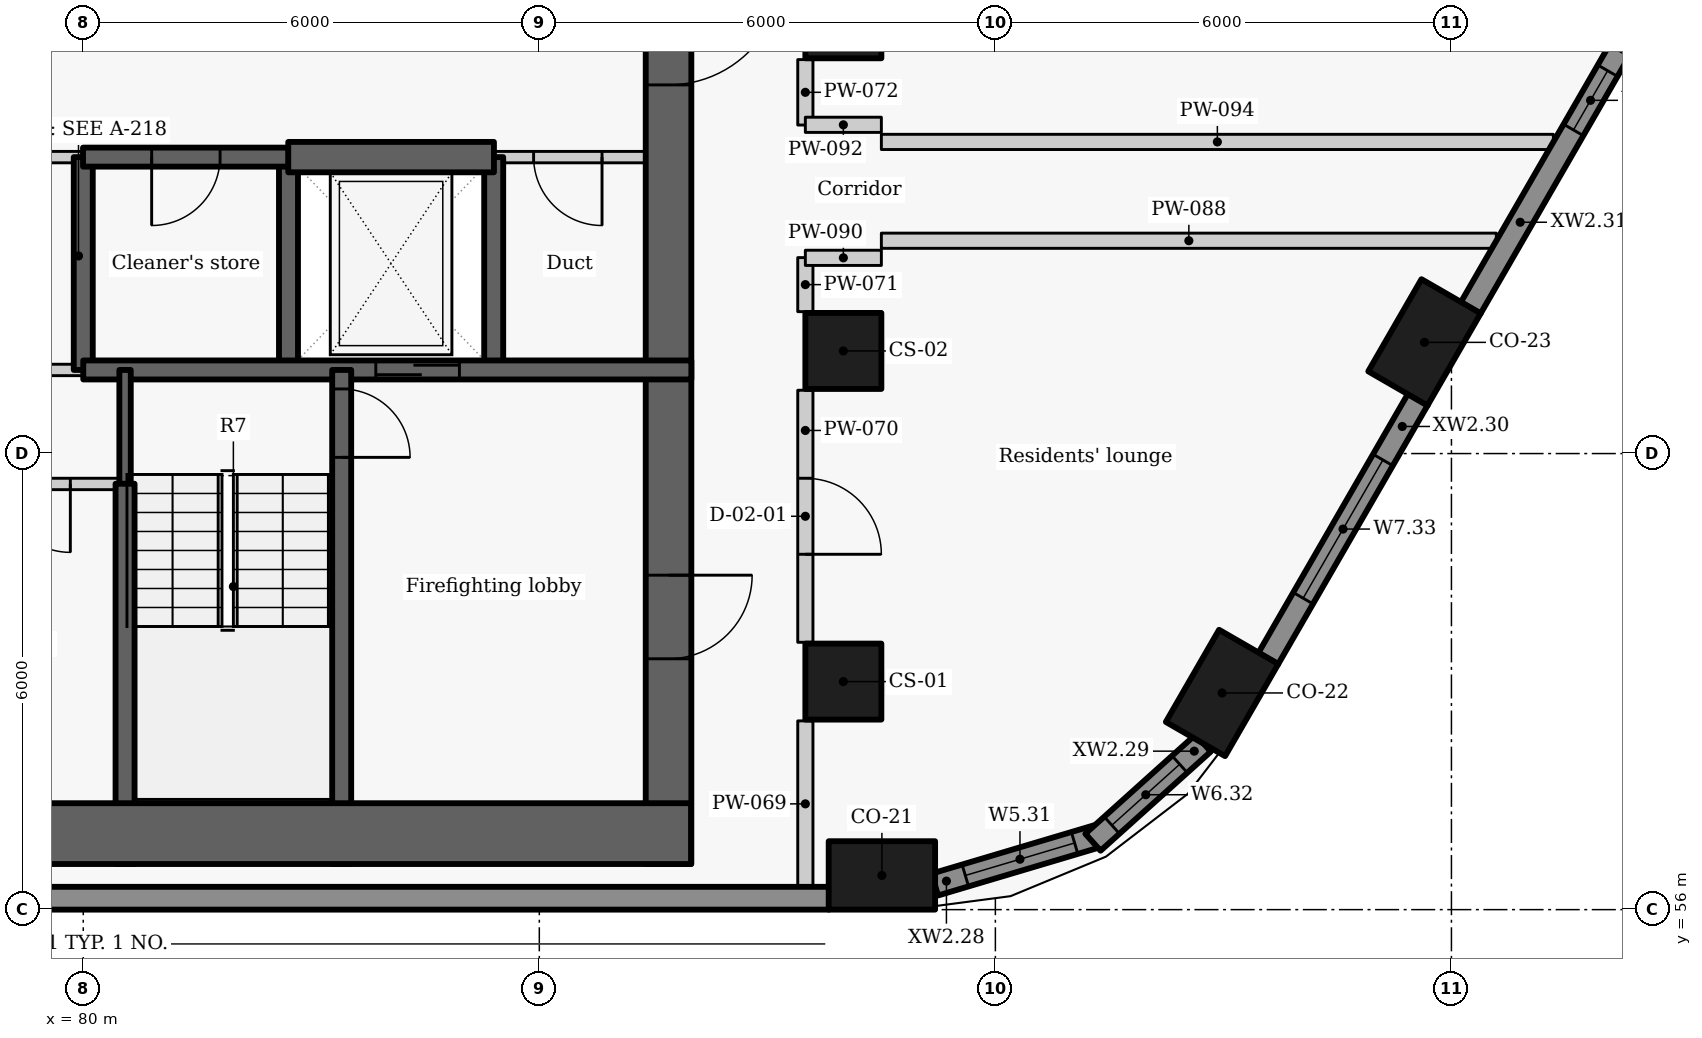
"""IFC4 building model, lengths in metres.
Left out: names, types, materials, properties, quantities, classifications, styles, units other than length and angle.
Written with IfcOpenShell. Run it as: python <this file> out.ifc"""

import sys

from ifc_helpers import new_model, si_unit, direction, frame, frame_2d, origin, origin_2d, place, context, subcontext, project, spatial, rectangle, extrude, element, fill, save


model = new_model("IFC4")
c1 = context("Model", 3, precision=1e-05, world=origin(), true_north=direction((0.0, 1.0)))
c2 = subcontext(c1, "Body", "Model", "MODEL_VIEW")
j1 = project(units=[si_unit("LENGTHUNIT", "METRE"), si_unit("PLANEANGLEUNIT", "RADIAN")], contexts=[c1])
p1 = place(None, origin())
s1 = spatial("IfcSite", under=j1, at=p1, CompositionType="ELEMENT")
p2 = place(p1, origin())
s2 = spatial("IfcBuilding", under=s1, at=p2, CompositionType="ELEMENT")
p3 = place(p2, frame((0.0, 0.0, 87.6)))
s3 = spatial("IfcBuildingStorey", under=s2, at=p3, CompositionType="ELEMENT", Elevation=87.6)
for number, where, z_axis, x_axis in (
    (1, (90.507, 56.45, 0.0), (0.0, 0.0, 1.0), (1.0, 0.0, 0.0)),
    (2, (94.982, 58.851, 0.0), (0.0, 0.0, 1.0), (0.5, 0.866, 0.0)),
    (3, (97.646, 63.463, 0.0), (0.0, 0.0, 1.0), (0.5, 0.866, 0.0)),
    (4, (100.308, 68.075, 0.0), (0.0, 0.0, 1.0), (0.5, 0.866, 0.0)),
):
    element("IfcColumn", number, at=place(p3, frame(where, z_axis=z_axis, x_axis=x_axis)), inside=s3, PredefinedType="COLUMN", context=c2, shape_type="SweptSolid", body=[
        extrude(rectangle(XDim=1.4, YDim=0.9, at=origin_2d()), origin(), (0.0, 0.0, 1.0), 3.3),
    ])
for number, where, z_axis, x_axis in (
    (5, (90.0, 59.0, 0.0), (0.0, 0.0, 1.0), (0.0, 1.0, 0.0)),
    (6, (90.0, 63.35, 0.0), (0.0, 0.0, 1.0), (0.0, 1.0, 0.0)),
    (7, (90.0, 67.7, 0.0), (0.0, 0.0, 1.0), (0.0, 1.0, 0.0)),
):
    element("IfcColumn", number, at=place(p3, frame(where, z_axis=z_axis, x_axis=x_axis)), inside=s3, PredefinedType="COLUMN", context=c2, shape_type="SweptSolid", body=[
        extrude(rectangle(XDim=1.0, YDim=1.0, at=origin_2d()), origin(), (0.0, 0.0, 1.0), 3.3),
    ])
p4 = place(p3, frame((69.871, 56.15, 0.0), z_axis=(0.0, 0.0, 1.0), x_axis=(1.0, 0.0, 0.0)))
e8 = element("IfcWall", 8, at=p4, inside=s3, PredefinedType="SOLIDWALL", context=c2, shape_type="SweptSolid", body=[
    extrude(rectangle(XDim=19.94, YDim=0.3, at=frame_2d((9.97, 0.0))), origin(), (0.0, 0.0, 1.0), 2.425),
])
p5 = place(p3, frame((91.203, 56.33, 0.0), z_axis=(0.0, 0.0, 1.0), x_axis=(0.95847736903, 0.285168604614, 0.0)))
e9 = element("IfcWall", 9, at=p5, inside=s3, PredefinedType="SOLIDWALL", context=c2, shape_type="SweptSolid", body=[
    extrude(rectangle(XDim=2.262, YDim=0.3, at=frame_2d((1.131, 0.0))), origin(), (0.0, 0.0, 1.0), 2.425),
])
p6 = place(p5, frame((0.419, 0.0, 0.9)))
e10 = element("IfcOpeningElement", 10, at=p6, cuts=e9, PredefinedType="OPENING", context=c2, shape_type="SweptSolid", body=[
    extrude(rectangle(XDim=1.5, YDim=1.1, at=frame_2d((0.75, 0.55))), frame((0.0, 0.16, 0.0), z_axis=(0.0, -1.0, 0.0), x_axis=(1.0, 0.0, 0.0)), (0.0, 0.0, 1.0), 0.32),
])
p7 = place(p3, frame((93.283, 56.887, 0.0), z_axis=(0.0, 0.0, 1.0), x_axis=(0.743785734967, 0.668418117992, 0.0)))
e11 = element("IfcWall", 11, at=p7, inside=s3, PredefinedType="SOLIDWALL", context=c2, shape_type="SweptSolid", body=[
    extrude(rectangle(XDim=1.95, YDim=0.3, at=frame_2d((0.975, 0.0))), origin(), (0.0, 0.0, 1.0), 2.425),
])
p8 = place(p7, frame((0.335, 0.0, 0.9)))
e12 = element("IfcOpeningElement", 12, at=p8, cuts=e11, PredefinedType="OPENING", context=c2, shape_type="SweptSolid", body=[
    extrude(rectangle(XDim=1.2, YDim=1.1, at=frame_2d((0.6, 0.55))), frame((0.0, 0.16, 0.0), z_axis=(0.0, -1.0, 0.0), x_axis=(1.0, 0.0, 0.0)), (0.0, 0.0, 1.0), 0.32),
])
p9 = place(p3, frame((95.59, 59.303, 0.0), z_axis=(0.0, 0.0, 1.0), x_axis=(0.500003583557, 0.866023334807, 0.0)))
e13 = element("IfcWall", 13, at=p9, inside=s3, PredefinedType="SOLIDWALL", context=c2, shape_type="SweptSolid", body=[
    extrude(rectangle(XDim=3.934, YDim=0.3, at=frame_2d((1.967, 0.0))), origin(), (0.0, 0.0, 1.0), 2.425),
])
p10 = place(p9, frame((0.917, 0.0, 0.9)))
e14 = element("IfcOpeningElement", 14, at=p10, cuts=e13, PredefinedType="OPENING", context=c2, shape_type="SweptSolid", body=[
    extrude(rectangle(XDim=2.1, YDim=1.1, at=frame_2d((1.05, 0.55))), frame((0.0, 0.16, 0.0), z_axis=(0.0, -1.0, 0.0), x_axis=(1.0, 0.0, 0.0)), (0.0, 0.0, 1.0), 0.32),
])
p11 = place(p3, frame((98.253, 63.916, 0.0), z_axis=(0.0, 0.0, 1.0), x_axis=(0.499957037901, 0.866050206543, 0.0)))
e15 = element("IfcWall", 15, at=p11, inside=s3, PredefinedType="SOLIDWALL", context=c2, shape_type="SweptSolid", body=[
    extrude(rectangle(XDim=3.934, YDim=0.3, at=frame_2d((1.967, 0.0))), origin(), (0.0, 0.0, 1.0), 2.425),
])
p12 = place(p11, frame((2.704, 0.0, 0.9)))
e16 = element("IfcOpeningElement", 16, at=p12, cuts=e15, PredefinedType="OPENING", context=c2, shape_type="SweptSolid", body=[
    extrude(rectangle(XDim=0.9, YDim=1.1, at=frame_2d((0.45, 0.55))), frame((0.0, 0.16, 0.0), z_axis=(0.0, -1.0, 0.0), x_axis=(1.0, 0.0, 0.0)), (0.0, 0.0, 1.0), 0.32),
])
for number, where, z_axis, x_axis in (
    (17, (80.0, 63.1, -0.275), (0.0, 0.0, 1.0), (0.0, 1.0, 0.0)),
    (18, (82.7, 63.1, -0.275), (0.0, 0.0, 1.0), (0.0, 1.0, 0.0)),
    (19, (85.4, 63.1, -0.275), (0.0, 0.0, 1.0), (0.0, 1.0, 0.0)),
):
    element("IfcWall", number, at=place(p3, frame(where, z_axis=z_axis, x_axis=x_axis)), inside=s3, PredefinedType="SHEAR", context=c2, shape_type="SweptSolid", body=[
        extrude(rectangle(XDim=2.8, YDim=0.25, at=frame_2d((1.4, 0.0))), origin(), (0.0, 0.0, 1.0), 3.3),
    ])
p13 = place(p3, frame((87.7, 72.2, -0.275), z_axis=(0.0, 0.0, 1.0), x_axis=(0.0, -1.0, 0.0)))
e20 = element("IfcWall", 20, at=p13, inside=s3, PredefinedType="SHEAR", context=c2, shape_type="SweptSolid", body=[
    extrude(rectangle(XDim=15.6, YDim=0.6, at=frame_2d((7.8, 0.0))), origin(), (0.0, 0.0, 1.0), 3.3),
])
p14 = place(p13, frame((3.85, 0.0, 0.275)))
e21 = element("IfcOpeningElement", 21, at=p14, cuts=e20, PredefinedType="OPENING", context=c2, shape_type="SweptSolid", body=[
    extrude(rectangle(XDim=1.5, YDim=2.1, at=frame_2d((0.75, 1.05))), frame((0.0, 0.31, 0.0), z_axis=(0.0, -1.0, 0.0), x_axis=(1.0, 0.0, 0.0)), (0.0, 0.0, 1.0), 0.62),
])
p15 = place(p13, frame((11.8, 0.0, 0.275)))
e22 = element("IfcOpeningElement", 22, at=p15, cuts=e20, PredefinedType="OPENING", context=c2, shape_type="SweptSolid", body=[
    extrude(rectangle(XDim=1.1, YDim=2.1, at=frame_2d((0.55, 1.05))), frame((0.0, 0.31, 0.0), z_axis=(0.0, -1.0, 0.0), x_axis=(1.0, 0.0, 0.0)), (0.0, 0.0, 1.0), 0.62),
])
p16 = place(p3, frame((80.003, 65.9, 0.0), z_axis=(0.0, 0.0, 1.0), x_axis=(-1.0, 0.0, 0.0)))
e23 = element("IfcWall", 23, at=p16, inside=s3, PredefinedType="PARTITIONING", context=c2, shape_type="SweptSolid", body=[
    extrude(rectangle(XDim=2.706, YDim=0.15, at=frame_2d((1.353, 0.0))), origin(), (0.0, 0.0, 1.0), 3.025),
])
p17 = place(p16, frame((0.753, 0.0, 0.0)))
e24 = element("IfcOpeningElement", 24, at=p17, cuts=e23, PredefinedType="OPENING", context=c2, shape_type="SweptSolid", body=[
    extrude(rectangle(XDim=1.2, YDim=2.1, at=frame_2d((0.6, 1.05))), frame((0.0, 0.085, 0.0), z_axis=(0.0, -1.0, 0.0), x_axis=(1.0, 0.0, 0.0)), (0.0, 0.0, 1.0), 0.17),
])
p18 = place(p3, frame((88.0, 65.9, 0.0), z_axis=(0.0, 0.0, 1.0), x_axis=(-1.0, 0.0, 0.0)))
e25 = element("IfcWall", 25, at=p18, inside=s3, PredefinedType="PARTITIONING", context=c2, shape_type="SweptSolid", body=[
    extrude(rectangle(XDim=2.603, YDim=0.15, at=frame_2d((1.302, 0.0))), origin(), (0.0, 0.0, 1.0), 3.025),
])
p19 = place(p18, frame((1.175, 0.0, 0.0)))
e26 = element("IfcOpeningElement", 26, at=p19, cuts=e25, PredefinedType="OPENING", context=c2, shape_type="SweptSolid", body=[
    extrude(rectangle(XDim=0.9, YDim=2.1, at=frame_2d((0.45, 1.05))), frame((0.0, 0.085, 0.0), z_axis=(0.0, -1.0, 0.0), x_axis=(1.0, 0.0, 0.0)), (0.0, 0.0, 1.0), 0.17),
])
p20 = place(p3, frame((82.703, 65.9, -0.275), z_axis=(0.0, 0.0, 1.0), x_axis=(-1.0, 0.0, 0.0)))
e27 = element("IfcWall", 27, at=p20, inside=s3, PredefinedType="SHEAR", context=c2, shape_type="SweptSolid", body=[
    extrude(rectangle(XDim=2.706, YDim=0.25, at=frame_2d((1.353, 0.0))), origin(), (0.0, 0.0, 1.0), 3.3),
])
p21 = place(p20, frame((0.903, 0.0, 0.275)))
e28 = element("IfcOpeningElement", 28, at=p21, cuts=e27, PredefinedType="OPENING", context=c2, shape_type="SweptSolid", body=[
    extrude(rectangle(XDim=0.9, YDim=2.1, at=frame_2d((0.45, 1.05))), frame((0.0, 0.135, 0.0), z_axis=(0.0, -1.0, 0.0), x_axis=(1.0, 0.0, 0.0)), (0.0, 0.0, 1.0), 0.27),
])
p22 = place(p3, frame((82.697, 65.9, -0.275), z_axis=(0.0, 0.0, 1.0), x_axis=(1.0, 0.0, 0.0)))
e29 = element("IfcWall", 29, at=p22, inside=s3, PredefinedType="SHEAR", context=c2, shape_type="SweptSolid", body=[
    extrude(rectangle(XDim=2.706, YDim=0.4, at=frame_2d((1.353, 0.0))), origin(), (0.0, 0.0, 1.0), 3.3),
])
p23 = place(p3, frame((80.0, 63.1, -0.275), z_axis=(0.0, 0.0, 1.0), x_axis=(1.0, 0.0, 0.0)))
e30 = element("IfcWall", 30, at=p23, inside=s3, PredefinedType="SHEAR", context=c2, shape_type="SweptSolid", body=[
    extrude(rectangle(XDim=8.0, YDim=0.25, at=frame_2d((4.0, 0.0))), origin(), (0.0, 0.0, 1.0), 3.3),
])
p24 = place(p23, frame((3.849, 0.0, 0.275)))
e31 = element("IfcOpeningElement", 31, at=p24, cuts=e30, PredefinedType="OPENING", context=c2, shape_type="SweptSolid", body=[
    extrude(rectangle(XDim=1.1, YDim=2.1, at=frame_2d((0.55, 1.05))), frame((0.0, 0.135, 0.0), z_axis=(0.0, -1.0, 0.0), x_axis=(1.0, 0.0, 0.0)), (0.0, 0.0, 1.0), 0.27),
])
p25 = place(p3, frame((80.0, 63.1, 0.0), z_axis=(0.0, 0.0, 1.0), x_axis=(-1.0, 0.0, 0.0)))
e32 = element("IfcWall", 32, at=p25, inside=s3, PredefinedType="PARTITIONING", context=c2, shape_type="SweptSolid", body=[
    extrude(rectangle(XDim=2.7, YDim=0.15, at=frame_2d((1.35, 0.0))), origin(), (0.0, 0.0, 1.0), 3.025),
])
p26 = place(p25, frame((0.85, 0.0, 0.0)))
e33 = element("IfcOpeningElement", 33, at=p26, cuts=e32, PredefinedType="OPENING", context=c2, shape_type="SweptSolid", body=[
    extrude(rectangle(XDim=1.0, YDim=2.1, at=frame_2d((0.5, 1.05))), frame((0.0, 0.085, 0.0), z_axis=(0.0, -1.0, 0.0), x_axis=(1.0, 0.0, 0.0)), (0.0, 0.0, 1.0), 0.17),
])
p27 = place(p3, frame((83.4, 63.1, -0.275), z_axis=(0.0, 0.0, 1.0), x_axis=(0.0, -1.0, 0.0)))
e34 = element("IfcWall", 34, at=p27, inside=s3, PredefinedType="SHEAR", context=c2, shape_type="SweptSolid", body=[
    extrude(rectangle(XDim=6.5, YDim=0.25, at=frame_2d((3.25, 0.0))), origin(), (0.0, 0.0, 1.0), 3.3),
])
p28 = place(p27, frame((0.25, 0.0, 0.275)))
e35 = element("IfcOpeningElement", 35, at=p28, cuts=e34, PredefinedType="OPENING", context=c2, shape_type="SweptSolid", body=[
    extrude(rectangle(XDim=0.9, YDim=2.1, at=frame_2d((0.45, 1.05))), frame((0.0, 0.135, 0.0), z_axis=(0.0, -1.0, 0.0), x_axis=(1.0, 0.0, 0.0)), (0.0, 0.0, 1.0), 0.27),
])
p29 = place(p3, frame((80.55, 61.597, -0.275), z_axis=(0.0, 0.0, 1.0), x_axis=(0.0, 1.0, 0.0)))
e36 = element("IfcWall", 36, at=p29, inside=s3, PredefinedType="SHEAR", context=c2, shape_type="SweptSolid", body=[
    extrude(rectangle(XDim=1.503, YDim=0.15, at=frame_2d((0.751, 0.0))), origin(), (0.0, 0.0, 1.0), 3.3),
])
p30 = place(p3, frame((80.55, 56.6, -0.275), z_axis=(0.0, 0.0, 1.0), x_axis=(0.0, 1.0, 0.0)))
e37 = element("IfcWall", 37, at=p30, inside=s3, PredefinedType="SHEAR", context=c2, shape_type="SweptSolid", body=[
    extrude(rectangle(XDim=5.003, YDim=0.25, at=frame_2d((2.501, 0.0))), origin(), (0.0, 0.0, 1.0), 3.3),
])
p31 = place(p3, frame((80.55, 61.6, 0.0), z_axis=(0.0, 0.0, 1.0), x_axis=(-1.0, 0.0, 0.0)))
e38 = element("IfcWall", 38, at=p31, inside=s3, PredefinedType="PARTITIONING", context=c2, shape_type="SweptSolid", body=[
    extrude(rectangle(XDim=5.2, YDim=0.15, at=frame_2d((2.6, 0.0))), origin(), (0.0, 0.0, 1.0), 3.025),
])
p32 = place(p31, frame((4.1, 0.0, 0.0)))
e39 = element("IfcOpeningElement", 39, at=p32, cuts=e38, PredefinedType="OPENING", context=c2, shape_type="SweptSolid", body=[
    extrude(rectangle(XDim=0.9, YDim=2.1, at=frame_2d((0.45, 1.05))), frame((0.0, 0.085, 0.0), z_axis=(0.0, -1.0, 0.0), x_axis=(1.0, 0.0, 0.0)), (0.0, 0.0, 1.0), 0.17),
])
p33 = place(p31, frame((2.67, 0.0, 0.0)))
e40 = element("IfcOpeningElement", 40, at=p33, cuts=e38, PredefinedType="OPENING", context=c2, shape_type="SweptSolid", body=[
    extrude(rectangle(XDim=0.9, YDim=2.1, at=frame_2d((0.45, 1.05))), frame((0.0, 0.085, 0.0), z_axis=(0.0, -1.0, 0.0), x_axis=(1.0, 0.0, 0.0)), (0.0, 0.0, 1.0), 0.17),
])
p34 = place(p31, frame((0.72, 0.0, 0.0)))
e41 = element("IfcOpeningElement", 41, at=p34, cuts=e38, PredefinedType="OPENING", context=c2, shape_type="SweptSolid", body=[
    extrude(rectangle(XDim=0.9, YDim=2.1, at=frame_2d((0.45, 1.05))), frame((0.0, 0.085, 0.0), z_axis=(0.0, -1.0, 0.0), x_axis=(1.0, 0.0, 0.0)), (0.0, 0.0, 1.0), 0.17),
])
p35 = place(p3, frame((89.5, 56.3, 0.0), z_axis=(0.0, 0.0, 1.0), x_axis=(0.0, 1.0, 0.0)))
e42 = element("IfcWall", 42, at=p35, inside=s3, PredefinedType="PARTITIONING", context=c2, shape_type="SweptSolid", body=[
    extrude(rectangle(XDim=2.183, YDim=0.2, at=frame_2d((1.091, 0.0))), origin(), (0.0, 0.0, 1.0), 3.025),
])
p36 = place(p3, frame((89.5, 62.833, 0.0), z_axis=(0.0, 0.0, 1.0), x_axis=(0.0, -1.0, 0.0)))
e43 = element("IfcWall", 43, at=p36, inside=s3, PredefinedType="PARTITIONING", context=c2, shape_type="SweptSolid", body=[
    extrude(rectangle(XDim=3.316, YDim=0.2, at=frame_2d((1.658, 0.0))), origin(), (0.0, 0.0, 1.0), 3.025),
])
p37 = place(p36, frame((1.158, 0.0, 0.0)))
e44 = element("IfcOpeningElement", 44, at=p37, cuts=e43, PredefinedType="OPENING", context=c2, shape_type="SweptSolid", body=[
    extrude(rectangle(XDim=1.0, YDim=2.1, at=frame_2d((0.5, 1.05))), frame((0.0, 0.11, 0.0), z_axis=(0.0, -1.0, 0.0), x_axis=(1.0, 0.0, 0.0)), (0.0, 0.0, 1.0), 0.22),
])
p38 = place(p3, frame((89.5, 63.867, 0.0), z_axis=(0.0, 0.0, 1.0), x_axis=(0.0, 1.0, 0.0)))
e45 = element("IfcWall", 45, at=p38, inside=s3, PredefinedType="PARTITIONING", context=c2, shape_type="SweptSolid", body=[
    extrude(rectangle(XDim=0.711, YDim=0.2, at=frame_2d((0.355, 0.0))), origin(), (0.0, 0.0, 1.0), 3.025),
])
p39 = place(p3, frame((89.5, 66.322, 0.0), z_axis=(0.0, 0.0, 1.0), x_axis=(0.0, 1.0, 0.0)))
e46 = element("IfcWall", 46, at=p39, inside=s3, PredefinedType="PARTITIONING", context=c2, shape_type="SweptSolid", body=[
    extrude(rectangle(XDim=0.861, YDim=0.2, at=frame_2d((0.431, 0.0))), origin(), (0.0, 0.0, 1.0), 3.025),
])
p40 = place(p3, frame((90.5, 64.8, 0.0), z_axis=(0.0, 0.0, 1.0), x_axis=(1.0, 0.0, 0.0)))
e47 = element("IfcWall", 47, at=p40, inside=s3, PredefinedType="PARTITIONING", context=c2, shape_type="SweptSolid", body=[
    extrude(rectangle(XDim=8.091, YDim=0.2, at=frame_2d((4.045, 0.0))), origin(), (0.0, 0.0, 1.0), 2.405),
])
for number, where, z_axis, x_axis in (
    (48, (89.5, 64.575, 0.0), (0.0, 0.0, 1.0), (1.0, 0.0, 0.0)),
    (49, (89.5, 66.325, 0.0), (0.0, 0.0, 1.0), (1.0, 0.0, 0.0)),
):
    element("IfcWall", number, at=place(p3, frame(where, z_axis=z_axis, x_axis=x_axis)), inside=s3, PredefinedType="PARTITIONING", context=c2, shape_type="SweptSolid", body=[
        extrude(rectangle(XDim=1.0, YDim=0.2, at=frame_2d((0.5, 0.0))), origin(), (0.0, 0.0, 1.0), 2.505),
    ])
p41 = place(p3, frame((90.5, 66.1, 0.0), z_axis=(0.0, 0.0, 1.0), x_axis=(1.0, 0.0, 0.0)))
e50 = element("IfcWall", 50, at=p41, inside=s3, PredefinedType="PARTITIONING", context=c2, shape_type="SweptSolid", body=[
    extrude(rectangle(XDim=8.841, YDim=0.2, at=frame_2d((4.421, 0.0))), origin(), (0.0, 0.0, 1.0), 2.405),
])
p42 = place(p3, frame((72.004, 57.0, -0.275), z_axis=(0.0, 0.0, 1.0), x_axis=(1.0, 0.0, 0.0)))
e51 = element("IfcWall", 51, at=p42, inside=s3, PredefinedType="SHEAR", context=c2, shape_type="SweptSolid", body=[
    extrude(rectangle(XDim=15.992, YDim=0.8, at=frame_2d((7.996, 0.0))), origin(), (0.0, 0.0, 1.0), 3.3),
])
p43 = place(p6, origin())
e52 = element("IfcWindow", 52, at=p43, inside=s3, PartitioningType="SINGLE_PANEL", PredefinedType="WINDOW", context=c2, shape_type="SweptSolid", body=[
    extrude(rectangle(XDim=1.5, YDim=1.1, at=frame_2d((0.75, 0.55))), frame((0.0, 0.03, 0.0), z_axis=(0.0, -1.0, 0.0), x_axis=(1.0, 0.0, 0.0)), (0.0, 0.0, 1.0), 0.06),
])
fill(e10, e52)
p44 = place(p8, origin())
e53 = element("IfcWindow", 53, at=p44, inside=s3, PartitioningType="SINGLE_PANEL", PredefinedType="WINDOW", context=c2, shape_type="SweptSolid", body=[
    extrude(rectangle(XDim=1.2, YDim=1.1, at=frame_2d((0.6, 0.55))), frame((0.0, 0.03, 0.0), z_axis=(0.0, -1.0, 0.0), x_axis=(1.0, 0.0, 0.0)), (0.0, 0.0, 1.0), 0.06),
])
fill(e12, e53)
p45 = place(p10, origin())
e54 = element("IfcWindow", 54, at=p45, inside=s3, PartitioningType="SINGLE_PANEL", PredefinedType="WINDOW", context=c2, shape_type="SweptSolid", body=[
    extrude(rectangle(XDim=2.1, YDim=1.1, at=frame_2d((1.05, 0.55))), frame((0.0, 0.03, 0.0), z_axis=(0.0, -1.0, 0.0), x_axis=(1.0, 0.0, 0.0)), (0.0, 0.0, 1.0), 0.06),
])
fill(e14, e54)
p46 = place(p12, origin())
e55 = element("IfcWindow", 55, at=p46, inside=s3, PartitioningType="SINGLE_PANEL", PredefinedType="WINDOW", context=c2, shape_type="SweptSolid", body=[
    extrude(rectangle(XDim=0.9, YDim=1.1, at=frame_2d((0.45, 0.55))), frame((0.0, 0.03, 0.0), z_axis=(0.0, -1.0, 0.0), x_axis=(1.0, 0.0, 0.0)), (0.0, 0.0, 1.0), 0.06),
])
fill(e16, e55)
p47 = place(p21, origin())
e56 = element("IfcDoor", 56, at=p47, inside=s3, OperationType="SINGLE_SWING_RIGHT", PredefinedType="DOOR", context=c2, shape_type="SweptSolid", body=[
    extrude(rectangle(XDim=0.9, YDim=2.1, at=frame_2d((0.45, 1.05))), frame((0.0, 0.025, 0.0), z_axis=(0.0, -1.0, 0.0), x_axis=(1.0, 0.0, 0.0)), (0.0, 0.0, 1.0), 0.05),
])
fill(e28, e56)
p48 = place(p24, origin())
e57 = element("IfcDoor", 57, at=p48, inside=s3, OperationType="SLIDING_TO_LEFT", PredefinedType="DOOR", context=c2, shape_type="SweptSolid", body=[
    extrude(rectangle(XDim=1.1, YDim=2.1, at=frame_2d((0.55, 1.05))), frame((0.0, 0.025, 0.0), z_axis=(0.0, -1.0, 0.0), x_axis=(1.0, 0.0, 0.0)), (0.0, 0.0, 1.0), 0.05),
])
fill(e31, e57)
p49 = place(p19, origin())
e58 = element("IfcDoor", 58, at=p49, inside=s3, OperationType="SINGLE_SWING_LEFT", PredefinedType="DOOR", context=c2, shape_type="SweptSolid", body=[
    extrude(rectangle(XDim=0.9, YDim=2.1, at=frame_2d((0.45, 1.05))), frame((0.0, 0.025, 0.0), z_axis=(0.0, -1.0, 0.0), x_axis=(1.0, 0.0, 0.0)), (0.0, 0.0, 1.0), 0.05),
])
fill(e26, e58)
p50 = place(p34, origin())
e59 = element("IfcDoor", 59, at=p50, inside=s3, OperationType="SINGLE_SWING_LEFT", PredefinedType="DOOR", context=c2, shape_type="SweptSolid", body=[
    extrude(rectangle(XDim=0.9, YDim=2.1, at=frame_2d((0.45, 1.05))), frame((0.0, 0.025, 0.0), z_axis=(0.0, -1.0, 0.0), x_axis=(1.0, 0.0, 0.0)), (0.0, 0.0, 1.0), 0.05),
])
fill(e41, e59)
p51 = place(p28, origin())
e60 = element("IfcDoor", 60, at=p51, inside=s3, OperationType="SINGLE_SWING_RIGHT", PredefinedType="DOOR", context=c2, shape_type="SweptSolid", body=[
    extrude(rectangle(XDim=0.9, YDim=2.1, at=frame_2d((0.45, 1.05))), frame((0.0, 0.025, 0.0), z_axis=(0.0, -1.0, 0.0), x_axis=(1.0, 0.0, 0.0)), (0.0, 0.0, 1.0), 0.05),
])
fill(e35, e60)
p52 = place(p37, origin())
e61 = element("IfcDoor", 61, at=p52, inside=s3, OperationType="SINGLE_SWING_RIGHT", PredefinedType="DOOR", context=c2, shape_type="SweptSolid", body=[
    extrude(rectangle(XDim=1.0, YDim=2.1, at=frame_2d((0.5, 1.05))), frame((0.0, 0.025, 0.0), z_axis=(0.0, -1.0, 0.0), x_axis=(1.0, 0.0, 0.0)), (0.0, 0.0, 1.0), 0.05),
])
fill(e44, e61)
p53 = place(p14, origin())
e62 = element("IfcDoor", 62, at=p53, inside=s3, OperationType="DOUBLE_DOOR_SINGLE_SWING", PredefinedType="DOOR", context=c2, shape_type="SweptSolid", body=[
    extrude(rectangle(XDim=1.5, YDim=2.1, at=frame_2d((0.75, 1.05))), frame((0.0, 0.025, 0.0), z_axis=(0.0, -1.0, 0.0), x_axis=(1.0, 0.0, 0.0)), (0.0, 0.0, 1.0), 0.05),
])
fill(e21, e62)
p54 = place(p15, origin())
e63 = element("IfcDoor", 63, at=p54, inside=s3, OperationType="SINGLE_SWING_LEFT", PredefinedType="DOOR", context=c2, shape_type="SweptSolid", body=[
    extrude(rectangle(XDim=1.1, YDim=2.1, at=frame_2d((0.55, 1.05))), frame((0.0, 0.025, 0.0), z_axis=(0.0, -1.0, 0.0), x_axis=(1.0, 0.0, 0.0)), (0.0, 0.0, 1.0), 0.05),
])
fill(e22, e63)
save(model, sys.argv[1])
